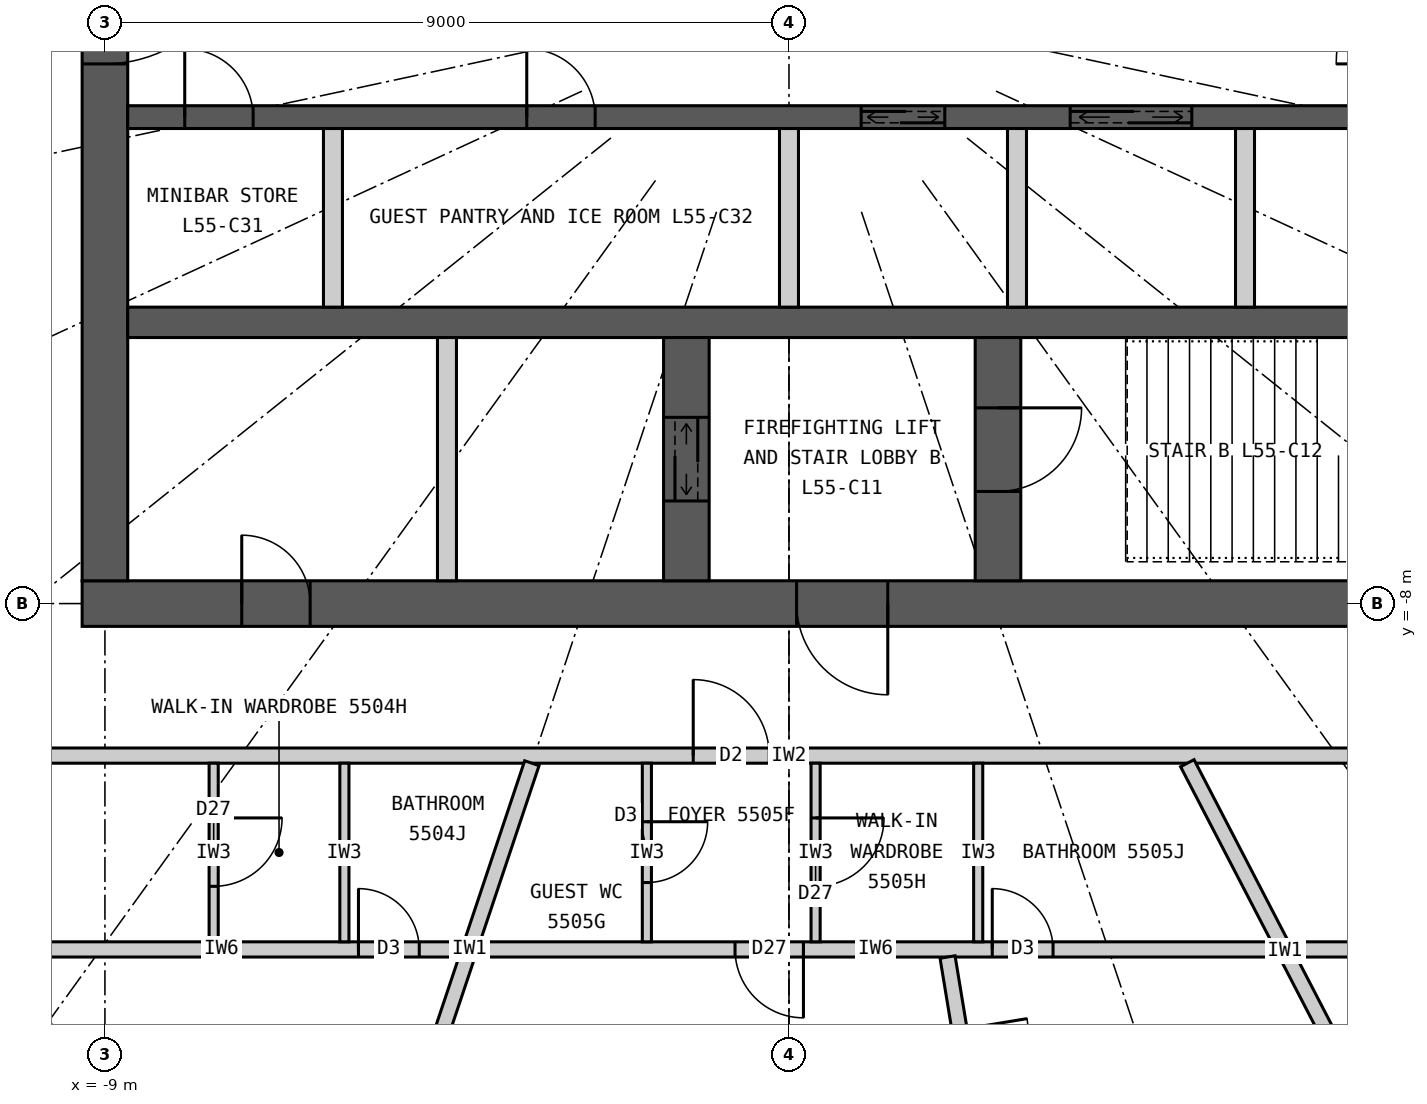
"""IFC4 building model, lengths in metres.
Left out: names, types, materials, properties, quantities, classifications, styles, units other than length and angle.
Written with IfcOpenShell. Run it as: python <this file> out.ifc"""

import sys

from ifc_helpers import new_model, si_unit, direction, frame, frame_2d, origin, origin_2d, place, context, subcontext, project, spatial, rectangle, circle, extrude, element, fill, save


model = new_model("IFC4")
c1 = context("Model", 3, precision=1e-05, world=origin(), true_north=direction((0.0, 1.0)))
c2 = subcontext(c1, "Body", "Model", "MODEL_VIEW")
j1 = project(units=[si_unit("LENGTHUNIT", "METRE"), si_unit("PLANEANGLEUNIT", "RADIAN")], contexts=[c1])
p1 = place(None, origin())
s1 = spatial("IfcSite", under=j1, at=p1, CompositionType="ELEMENT")
p2 = place(p1, origin())
s2 = spatial("IfcBuilding", under=s1, at=p2, CompositionType="ELEMENT")
p3 = place(p2, frame((0.0, 0.0, 206.1)))
s3 = spatial("IfcBuildingStorey", under=s2, at=p3, CompositionType="ELEMENT", Elevation=206.1)
p4 = place(p3, frame((-10.019, -13.883, 0.0), z_axis=(0.0, 0.0, 1.0), x_axis=(1.0, 0.0, 0.0)))
e1 = element("IfcColumn", 1, at=p4, inside=s3, PredefinedType="COLUMN", context=c2, shape_type="SweptSolid", body=[
    extrude(circle(Radius=0.45, at=origin_2d()), origin(), (0.0, 0.0, 1.0), 3.3),
])
p5 = place(p3, frame((9.3, -8.0, 0.0), z_axis=(0.0, 0.0, 1.0), x_axis=(-1.0, 0.0, 0.0)))
e2 = element("IfcWall", 2, at=p5, inside=s3, PredefinedType="SHEAR", context=c2, shape_type="SweptSolid", body=[
    extrude(rectangle(XDim=18.6, YDim=0.6, at=frame_2d((9.3, 0.0))), origin(), (0.0, 0.0, 1.0), 3.3),
])
p6 = place(p5, frame((8.0, 0.0, 0.0)))
e3 = element("IfcOpeningElement", 3, at=p6, cuts=e2, PredefinedType="OPENING", context=c2, shape_type="SweptSolid", body=[
    extrude(rectangle(XDim=1.2, YDim=2.2, at=frame_2d((0.6, 1.1))), frame((0.0, 0.31, 0.0), z_axis=(0.0, -1.0, 0.0), x_axis=(1.0, 0.0, 0.0)), (0.0, 0.0, 1.0), 0.62),
])
p7 = place(p5, frame((15.6, 0.0, 0.0)))
e4 = element("IfcOpeningElement", 4, at=p7, cuts=e2, PredefinedType="OPENING", context=c2, shape_type="SweptSolid", body=[
    extrude(rectangle(XDim=0.9, YDim=2.2, at=frame_2d((0.45, 1.1))), frame((0.0, 0.31, 0.0), z_axis=(0.0, -1.0, 0.0), x_axis=(1.0, 0.0, 0.0)), (0.0, 0.0, 1.0), 0.62),
])
p8 = place(p3, frame((-9.0, 7.7, 0.0), z_axis=(0.0, 0.0, 1.0), x_axis=(0.0, -1.0, 0.0)))
e5 = element("IfcWall", 5, at=p8, inside=s3, PredefinedType="SHEAR", context=c2, shape_type="SweptSolid", body=[
    extrude(rectangle(XDim=15.4, YDim=0.6, at=frame_2d((7.7, 0.0))), origin(), (0.0, 0.0, 1.0), 3.3),
])
p9 = place(p8, frame((6.8, 0.0, 0.0)))
e6 = element("IfcOpeningElement", 6, at=p9, cuts=e5, PredefinedType="OPENING", context=c2, shape_type="SweptSolid", body=[
    extrude(rectangle(XDim=1.8, YDim=2.2, at=frame_2d((0.9, 1.1))), frame((0.0, 0.31, 0.0), z_axis=(0.0, -1.0, 0.0), x_axis=(1.0, 0.0, 0.0)), (0.0, 0.0, 1.0), 0.62),
])
p10 = place(p3, frame((-8.7, -4.3, 0.0), z_axis=(0.0, 0.0, 1.0), x_axis=(1.0, 0.0, 0.0)))
e7 = element("IfcWall", 7, at=p10, inside=s3, PredefinedType="SHEAR", context=c2, shape_type="SweptSolid", body=[
    extrude(rectangle(XDim=17.4, YDim=0.4, at=frame_2d((8.7, 0.0))), origin(), (0.0, 0.0, 1.0), 3.3),
])
p11 = place(p3, frame((-8.7, -1.6, 0.0), z_axis=(0.0, 0.0, 1.0), x_axis=(1.0, 0.0, 0.0)))
e8 = element("IfcWall", 8, at=p11, inside=s3, PredefinedType="SHEAR", context=c2, shape_type="SweptSolid", body=[
    extrude(rectangle(XDim=17.4, YDim=0.3, at=frame_2d((8.7, 0.0))), origin(), (0.0, 0.0, 1.0), 3.3),
])
p12 = place(p11, frame((9.65, 0.0, 0.0)))
e9 = element("IfcOpeningElement", 9, at=p12, cuts=e8, PredefinedType="OPENING", context=c2, shape_type="SweptSolid", body=[
    extrude(rectangle(XDim=1.1, YDim=2.2, at=frame_2d((0.55, 1.1))), frame((0.0, 0.16, 0.0), z_axis=(0.0, -1.0, 0.0), x_axis=(1.0, 0.0, 0.0)), (0.0, 0.0, 1.0), 0.32),
])
p13 = place(p11, frame((12.4, 0.0, 0.0)))
e10 = element("IfcOpeningElement", 10, at=p13, cuts=e8, PredefinedType="OPENING", context=c2, shape_type="SweptSolid", body=[
    extrude(rectangle(XDim=1.6, YDim=2.4, at=frame_2d((0.8, 1.2))), frame((0.0, 0.16, 0.0), z_axis=(0.0, -1.0, 0.0), x_axis=(1.0, 0.0, 0.0)), (0.0, 0.0, 1.0), 0.32),
])
p14 = place(p11, frame((0.75, 0.0, 0.0)))
e11 = element("IfcOpeningElement", 11, at=p14, cuts=e8, PredefinedType="OPENING", context=c2, shape_type="SweptSolid", body=[
    extrude(rectangle(XDim=0.9, YDim=2.2, at=frame_2d((0.45, 1.1))), frame((0.0, 0.16, 0.0), z_axis=(0.0, -1.0, 0.0), x_axis=(1.0, 0.0, 0.0)), (0.0, 0.0, 1.0), 0.32),
])
p15 = place(p11, frame((5.25, 0.0, 0.0)))
e12 = element("IfcOpeningElement", 12, at=p15, cuts=e8, PredefinedType="OPENING", context=c2, shape_type="SweptSolid", body=[
    extrude(rectangle(XDim=0.9, YDim=2.2, at=frame_2d((0.45, 1.1))), frame((0.0, 0.16, 0.0), z_axis=(0.0, -1.0, 0.0), x_axis=(1.0, 0.0, 0.0)), (0.0, 0.0, 1.0), 0.32),
])
p16 = place(p3, frame((2.75, -7.7, 0.0), z_axis=(0.0, 0.0, 1.0), x_axis=(0.0, 1.0, 0.0)))
e13 = element("IfcWall", 13, at=p16, inside=s3, PredefinedType="SHEAR", context=c2, shape_type="SweptSolid", body=[
    extrude(rectangle(XDim=3.2, YDim=0.6, at=frame_2d((1.6, 0.0))), origin(), (0.0, 0.0, 1.0), 3.3),
])
p17 = place(p16, frame((1.175, 0.0, 0.0)))
e14 = element("IfcOpeningElement", 14, at=p17, cuts=e13, PredefinedType="OPENING", context=c2, shape_type="SweptSolid", body=[
    extrude(rectangle(XDim=1.1, YDim=2.2, at=frame_2d((0.55, 1.1))), frame((0.0, 0.31, 0.0), z_axis=(0.0, -1.0, 0.0), x_axis=(1.0, 0.0, 0.0)), (0.0, 0.0, 1.0), 0.62),
])
p18 = place(p3, frame((-1.35, -7.7, 0.0), z_axis=(0.0, 0.0, 1.0), x_axis=(0.0, 1.0, 0.0)))
e15 = element("IfcWall", 15, at=p18, inside=s3, PredefinedType="SHEAR", context=c2, shape_type="SweptSolid", body=[
    extrude(rectangle(XDim=3.2, YDim=0.6, at=frame_2d((1.6, 0.0))), origin(), (0.0, 0.0, 1.0), 3.3),
])
p19 = place(p18, frame((1.05, 0.0, 0.0)))
e16 = element("IfcOpeningElement", 16, at=p19, cuts=e15, PredefinedType="OPENING", context=c2, shape_type="SweptSolid", body=[
    extrude(rectangle(XDim=1.1, YDim=2.2, at=frame_2d((0.55, 1.1))), frame((0.0, 0.31, 0.0), z_axis=(0.0, -1.0, 0.0), x_axis=(1.0, 0.0, 0.0)), (0.0, 0.0, 1.0), 0.62),
])
p20 = place(p3, frame((-4.5, -7.7, 0.0), z_axis=(0.0, 0.0, 1.0), x_axis=(0.0, 1.0, 0.0)))
e17 = element("IfcWall", 17, at=p20, inside=s3, PredefinedType="PARTITIONING", context=c2, shape_type="SweptSolid", body=[
    extrude(rectangle(XDim=3.2, YDim=0.25, at=frame_2d((1.6, 0.0))), origin(), (0.0, 0.0, 1.0), 3.3),
])
for number, where, z_axis, x_axis in (
    (18, (-6.0, -4.1, 0.0), (0.0, 0.0, 1.0), (0.0, 1.0, 0.0)),
    (19, (0.0, -4.1, 0.0), (0.0, 0.0, 1.0), (0.0, 1.0, 0.0)),
    (20, (3.0, -4.1, 0.0), (0.0, 0.0, 1.0), (0.0, 1.0, 0.0)),
    (21, (6.0, -4.1, 0.0), (0.0, 0.0, 1.0), (0.0, 1.0, 0.0)),
):
    element("IfcWall", number, at=place(p3, frame(where, z_axis=z_axis, x_axis=x_axis)), inside=s3, PredefinedType="PARTITIONING", context=c2, shape_type="SweptSolid", body=[
        extrude(rectangle(XDim=2.35, YDim=0.25, at=frame_2d((1.175, 0.0))), origin(), (0.0, 0.0, 1.0), 3.3),
    ])
p21 = place(p3, frame((11.1, -10.0, 0.0), z_axis=(0.0, 0.0, 1.0), x_axis=(-1.0, 0.0, 0.0)))
e22 = element("IfcWall", 22, at=p21, inside=s3, PredefinedType="PARTITIONING", context=c2, shape_type="SweptSolid", body=[
    extrude(rectangle(XDim=22.2, YDim=0.2, at=frame_2d((11.1, 0.0))), origin(), (0.0, 0.0, 1.0), 3.12),
])
p22 = place(p21, frame((11.36, 0.0, 0.0)))
e23 = element("IfcOpeningElement", 23, at=p22, cuts=e22, PredefinedType="OPENING", context=c2, shape_type="SweptSolid", body=[
    extrude(rectangle(XDim=1.0, YDim=2.2, at=frame_2d((0.5, 1.1))), frame((0.0, 0.11, 0.0), z_axis=(0.0, -1.0, 0.0), x_axis=(1.0, 0.0, 0.0)), (0.0, 0.0, 1.0), 0.22),
])
p23 = place(p21, frame((0.595, 0.0, 0.0)))
e24 = element("IfcOpeningElement", 24, at=p23, cuts=e22, PredefinedType="OPENING", context=c2, shape_type="SweptSolid", body=[
    extrude(rectangle(XDim=1.0, YDim=2.2, at=frame_2d((0.5, 1.1))), frame((0.0, 0.11, 0.0), z_axis=(0.0, -1.0, 0.0), x_axis=(1.0, 0.0, 0.0)), (0.0, 0.0, 1.0), 0.22),
])
p24 = place(p3, frame((-3.383, -10.1, 0.0), z_axis=(0.0, 0.0, 1.0), x_axis=(-0.317602151035, -0.948224063003, 0.0)))
e25 = element("IfcWall", 25, at=p24, inside=s3, PredefinedType="PARTITIONING", context=c2, shape_type="SweptSolid", body=[
    extrude(rectangle(XDim=5.168, YDim=0.2, at=frame_2d((2.584, 0.0))), origin(), (0.0, 0.0, 1.0), 2.42),
])
p25 = place(p3, frame((5.241, -10.1, 0.0), z_axis=(0.0, 0.0, 1.0), x_axis=(0.460603196597, -0.887606160008, 0.0)))
e26 = element("IfcWall", 26, at=p25, inside=s3, PredefinedType="PARTITIONING", context=c2, shape_type="SweptSolid", body=[
    extrude(rectangle(XDim=5.58, YDim=0.2, at=frame_2d((2.79, 0.0))), origin(), (0.0, 0.0, 1.0), 3.12),
])
p26 = place(p3, frame((-10.609, -12.55, 0.0), z_axis=(0.0, 0.0, 1.0), x_axis=(1.0, 0.0, 0.0)))
e27 = element("IfcWall", 27, at=p26, inside=s3, PredefinedType="PARTITIONING", context=c2, shape_type="SweptSolid", body=[
    extrude(rectangle(XDim=6.284, YDim=0.2, at=frame_2d((3.142, 0.0))), origin(), (0.0, 0.0, 1.0), 3.12),
])
p27 = place(p26, frame((4.944, 0.0, 0.0)))
e28 = element("IfcOpeningElement", 28, at=p27, cuts=e27, PredefinedType="OPENING", context=c2, shape_type="SweptSolid", body=[
    extrude(rectangle(XDim=0.8, YDim=2.1, at=frame_2d((0.4, 1.05))), frame((0.0, 0.11, 0.0), z_axis=(0.0, -1.0, 0.0), x_axis=(1.0, 0.0, 0.0)), (0.0, 0.0, 1.0), 0.22),
])
p28 = place(p3, frame((-7.569, -10.1, 0.0), z_axis=(0.0, 0.0, 1.0), x_axis=(0.0, -1.0, 0.0)))
e29 = element("IfcWall", 29, at=p28, inside=s3, PredefinedType="PARTITIONING", context=c2, shape_type="SweptSolid", body=[
    extrude(rectangle(XDim=2.35, YDim=0.12, at=frame_2d((1.175, 0.0))), origin(), (0.0, 0.0, 1.0), 3.12),
])
p29 = place(p28, frame((0.72, 0.0, 0.0)))
e30 = element("IfcOpeningElement", 30, at=p29, cuts=e29, PredefinedType="OPENING", context=c2, shape_type="SweptSolid", body=[
    extrude(rectangle(XDim=0.9, YDim=2.1, at=frame_2d((0.45, 1.05))), frame((0.0, 0.07, 0.0), z_axis=(0.0, -1.0, 0.0), x_axis=(1.0, 0.0, 0.0)), (0.0, 0.0, 1.0), 0.14),
])
p30 = place(p3, frame((-5.849, -10.1, 0.0), z_axis=(0.0, 0.0, 1.0), x_axis=(0.0, -1.0, 0.0)))
e31 = element("IfcWall", 31, at=p30, inside=s3, PredefinedType="PARTITIONING", context=c2, shape_type="SweptSolid", body=[
    extrude(rectangle(XDim=2.35, YDim=0.12, at=frame_2d((1.175, 0.0))), origin(), (0.0, 0.0, 1.0), 3.12),
])
p31 = place(p3, frame((-4.082, -12.55, 0.0), z_axis=(0.0, 0.0, 1.0), x_axis=(1.0, 0.0, 0.0)))
e32 = element("IfcWall", 32, at=p31, inside=s3, PredefinedType="PARTITIONING", context=c2, shape_type="SweptSolid", body=[
    extrude(rectangle(XDim=10.446, YDim=0.2, at=frame_2d((5.223, 0.0))), origin(), (0.0, 0.0, 1.0), 3.12),
])
p32 = place(p31, frame((6.757, 0.0, 0.0)))
e33 = element("IfcOpeningElement", 33, at=p32, cuts=e32, PredefinedType="OPENING", context=c2, shape_type="SweptSolid", body=[
    extrude(rectangle(XDim=0.8, YDim=2.1, at=frame_2d((0.4, 1.05))), frame((0.0, 0.11, 0.0), z_axis=(0.0, -1.0, 0.0), x_axis=(1.0, 0.0, 0.0)), (0.0, 0.0, 1.0), 0.22),
])
p33 = place(p31, frame((3.372, 0.0, 0.0)))
e34 = element("IfcOpeningElement", 34, at=p33, cuts=e32, PredefinedType="OPENING", context=c2, shape_type="SweptSolid", body=[
    extrude(rectangle(XDim=0.9, YDim=2.1, at=frame_2d((0.45, 1.05))), frame((0.0, 0.11, 0.0), z_axis=(0.0, -1.0, 0.0), x_axis=(1.0, 0.0, 0.0)), (0.0, 0.0, 1.0), 0.22),
])
p34 = place(p3, frame((2.086, -12.65, 0.0), z_axis=(0.0, 0.0, 1.0), x_axis=(0.162664077359, -0.986681507852, 0.0)))
e35 = element("IfcWall", 35, at=p34, inside=s3, PredefinedType="PARTITIONING", context=c2, shape_type="SweptSolid", body=[
    extrude(rectangle(XDim=3.538, YDim=0.2, at=frame_2d((1.769, 0.0))), origin(), (0.0, 0.0, 1.0), 3.12),
])
p35 = place(p34, frame((0.97, 0.0, 0.0)))
e36 = element("IfcOpeningElement", 36, at=p35, cuts=e35, PredefinedType="OPENING", context=c2, shape_type="SweptSolid", body=[
    extrude(rectangle(XDim=0.9, YDim=2.1, at=frame_2d((0.45, 1.05))), frame((0.0, 0.11, 0.0), z_axis=(0.0, -1.0, 0.0), x_axis=(1.0, 0.0, 0.0)), (0.0, 0.0, 1.0), 0.22),
])
p36 = place(p3, frame((-1.87, -10.1, 0.0), z_axis=(0.0, 0.0, 1.0), x_axis=(0.0, -1.0, 0.0)))
e37 = element("IfcWall", 37, at=p36, inside=s3, PredefinedType="PARTITIONING", context=c2, shape_type="SweptSolid", body=[
    extrude(rectangle(XDim=2.35, YDim=0.12, at=frame_2d((1.175, 0.0))), origin(), (0.0, 0.0, 1.0), 3.12),
])
p37 = place(p36, frame((0.77, 0.0, 0.0)))
e38 = element("IfcOpeningElement", 38, at=p37, cuts=e37, PredefinedType="OPENING", context=c2, shape_type="SweptSolid", body=[
    extrude(rectangle(XDim=0.8, YDim=2.1, at=frame_2d((0.4, 1.05))), frame((0.0, 0.07, 0.0), z_axis=(0.0, -1.0, 0.0), x_axis=(1.0, 0.0, 0.0)), (0.0, 0.0, 1.0), 0.14),
])
p38 = place(p3, frame((0.35, -10.1, 0.0), z_axis=(0.0, 0.0, 1.0), x_axis=(0.0, -1.0, 0.0)))
e39 = element("IfcWall", 39, at=p38, inside=s3, PredefinedType="PARTITIONING", context=c2, shape_type="SweptSolid", body=[
    extrude(rectangle(XDim=2.35, YDim=0.12, at=frame_2d((1.175, 0.0))), origin(), (0.0, 0.0, 1.0), 3.12),
])
p39 = place(p38, frame((0.72, 0.0, 0.0)))
e40 = element("IfcOpeningElement", 40, at=p39, cuts=e39, PredefinedType="OPENING", context=c2, shape_type="SweptSolid", body=[
    extrude(rectangle(XDim=0.9, YDim=2.1, at=frame_2d((0.45, 1.05))), frame((0.0, 0.07, 0.0), z_axis=(0.0, -1.0, 0.0), x_axis=(1.0, 0.0, 0.0)), (0.0, 0.0, 1.0), 0.14),
])
p40 = place(p3, frame((2.49, -10.1, 0.0), z_axis=(0.0, 0.0, 1.0), x_axis=(0.0, -1.0, 0.0)))
e41 = element("IfcWall", 41, at=p40, inside=s3, PredefinedType="PARTITIONING", context=c2, shape_type="SweptSolid", body=[
    extrude(rectangle(XDim=2.35, YDim=0.12, at=frame_2d((1.175, 0.0))), origin(), (0.0, 0.0, 1.0), 3.12),
])
p41 = place(p3, frame((6.661, -12.55, 0.0), z_axis=(0.0, 0.0, 1.0), x_axis=(1.0, 0.0, 0.0)))
e42 = element("IfcWall", 42, at=p41, inside=s3, PredefinedType="PARTITIONING", context=c2, shape_type="SweptSolid", body=[
    extrude(rectangle(XDim=3.947, YDim=0.2, at=frame_2d((1.974, 0.0))), origin(), (0.0, 0.0, 1.0), 3.12),
])
p42 = place(p41, frame((1.52, 0.0, 0.0)))
e43 = element("IfcOpeningElement", 43, at=p42, cuts=e42, PredefinedType="OPENING", context=c2, shape_type="SweptSolid", body=[
    extrude(rectangle(XDim=0.9, YDim=2.1, at=frame_2d((0.45, 1.05))), frame((0.0, 0.11, 0.0), z_axis=(0.0, -1.0, 0.0), x_axis=(1.0, 0.0, 0.0)), (0.0, 0.0, 1.0), 0.22),
])
p43 = place(p29, origin())
e44 = element("IfcDoor", 44, at=p43, inside=s3, OperationType="SINGLE_SWING_LEFT", PredefinedType="DOOR", context=c2, shape_type="SweptSolid", body=[
    extrude(rectangle(XDim=0.9, YDim=2.1, at=frame_2d((0.45, 1.05))), frame((0.0, 0.025, 0.0), z_axis=(0.0, -1.0, 0.0), x_axis=(1.0, 0.0, 0.0)), (0.0, 0.0, 1.0), 0.05),
])
fill(e30, e44)
p44 = place(p27, origin())
e45 = element("IfcDoor", 45, at=p44, inside=s3, OperationType="SINGLE_SWING_LEFT", PredefinedType="DOOR", context=c2, shape_type="SweptSolid", body=[
    extrude(rectangle(XDim=0.8, YDim=2.1, at=frame_2d((0.4, 1.05))), frame((0.0, 0.025, 0.0), z_axis=(0.0, -1.0, 0.0), x_axis=(1.0, 0.0, 0.0)), (0.0, 0.0, 1.0), 0.05),
])
fill(e28, e45)
p45 = place(p22, origin())
e46 = element("IfcDoor", 46, at=p45, inside=s3, OperationType="SINGLE_SWING_RIGHT", PredefinedType="DOOR", context=c2, shape_type="SweptSolid", body=[
    extrude(rectangle(XDim=1.0, YDim=2.2, at=frame_2d((0.5, 1.1))), frame((0.0, 0.025, 0.0), z_axis=(0.0, -1.0, 0.0), x_axis=(1.0, 0.0, 0.0)), (0.0, 0.0, 1.0), 0.05),
])
fill(e23, e46)
p46 = place(p37, origin())
e47 = element("IfcDoor", 47, at=p46, inside=s3, OperationType="SINGLE_SWING_LEFT", PredefinedType="DOOR", context=c2, shape_type="SweptSolid", body=[
    extrude(rectangle(XDim=0.8, YDim=2.1, at=frame_2d((0.4, 1.05))), frame((0.0, 0.025, 0.0), z_axis=(0.0, -1.0, 0.0), x_axis=(1.0, 0.0, 0.0)), (0.0, 0.0, 1.0), 0.05),
])
fill(e38, e47)
p47 = place(p39, origin())
e48 = element("IfcDoor", 48, at=p47, inside=s3, OperationType="SINGLE_SWING_LEFT", PredefinedType="DOOR", context=c2, shape_type="SweptSolid", body=[
    extrude(rectangle(XDim=0.9, YDim=2.1, at=frame_2d((0.45, 1.05))), frame((0.0, 0.025, 0.0), z_axis=(0.0, -1.0, 0.0), x_axis=(1.0, 0.0, 0.0)), (0.0, 0.0, 1.0), 0.05),
])
fill(e40, e48)
p48 = place(p32, origin())
e49 = element("IfcDoor", 49, at=p48, inside=s3, OperationType="SINGLE_SWING_LEFT", PredefinedType="DOOR", context=c2, shape_type="SweptSolid", body=[
    extrude(rectangle(XDim=0.8, YDim=2.1, at=frame_2d((0.4, 1.05))), frame((0.0, 0.025, 0.0), z_axis=(0.0, -1.0, 0.0), x_axis=(1.0, 0.0, 0.0)), (0.0, 0.0, 1.0), 0.05),
])
fill(e33, e49)
p49 = place(p33, origin())
e50 = element("IfcDoor", 50, at=p49, inside=s3, OperationType="SINGLE_SWING_RIGHT", PredefinedType="DOOR", context=c2, shape_type="SweptSolid", body=[
    extrude(rectangle(XDim=0.9, YDim=2.1, at=frame_2d((0.45, 1.05))), frame((0.0, 0.025, 0.0), z_axis=(0.0, -1.0, 0.0), x_axis=(1.0, 0.0, 0.0)), (0.0, 0.0, 1.0), 0.05),
])
fill(e34, e50)
p50 = place(p6, origin())
e51 = element("IfcDoor", 51, at=p50, inside=s3, OperationType="SINGLE_SWING_LEFT", PredefinedType="DOOR", context=c2, shape_type="SweptSolid", body=[
    extrude(rectangle(XDim=1.2, YDim=2.2, at=frame_2d((0.6, 1.1))), frame((0.0, 0.025, 0.0), z_axis=(0.0, -1.0, 0.0), x_axis=(1.0, 0.0, 0.0)), (0.0, 0.0, 1.0), 0.05),
])
fill(e3, e51)
p51 = place(p17, origin())
e52 = element("IfcDoor", 52, at=p51, inside=s3, OperationType="SINGLE_SWING_RIGHT", PredefinedType="DOOR", context=c2, shape_type="SweptSolid", body=[
    extrude(rectangle(XDim=1.1, YDim=2.2, at=frame_2d((0.55, 1.1))), frame((0.0, 0.025, 0.0), z_axis=(0.0, -1.0, 0.0), x_axis=(1.0, 0.0, 0.0)), (0.0, 0.0, 1.0), 0.05),
])
fill(e14, e52)
p52 = place(p19, origin())
e53 = element("IfcDoor", 53, at=p52, inside=s3, OperationType="DOUBLE_DOOR_SLIDING", PredefinedType="DOOR", context=c2, shape_type="SweptSolid", body=[
    extrude(rectangle(XDim=1.1, YDim=2.2, at=frame_2d((0.55, 1.1))), frame((0.0, 0.025, 0.0), z_axis=(0.0, -1.0, 0.0), x_axis=(1.0, 0.0, 0.0)), (0.0, 0.0, 1.0), 0.05),
])
fill(e16, e53)
p53 = place(p7, origin())
e54 = element("IfcDoor", 54, at=p53, inside=s3, OperationType="SINGLE_SWING_RIGHT", PredefinedType="DOOR", context=c2, shape_type="SweptSolid", body=[
    extrude(rectangle(XDim=0.9, YDim=2.2, at=frame_2d((0.45, 1.1))), frame((0.0, 0.025, 0.0), z_axis=(0.0, -1.0, 0.0), x_axis=(1.0, 0.0, 0.0)), (0.0, 0.0, 1.0), 0.05),
])
fill(e4, e54)
p54 = place(p12, origin())
e55 = element("IfcDoor", 55, at=p54, inside=s3, OperationType="DOUBLE_DOOR_SLIDING", PredefinedType="DOOR", context=c2, shape_type="SweptSolid", body=[
    extrude(rectangle(XDim=1.1, YDim=2.2, at=frame_2d((0.55, 1.1))), frame((0.0, 0.025, 0.0), z_axis=(0.0, -1.0, 0.0), x_axis=(1.0, 0.0, 0.0)), (0.0, 0.0, 1.0), 0.05),
])
fill(e9, e55)
p55 = place(p13, origin())
e56 = element("IfcDoor", 56, at=p55, inside=s3, OperationType="DOUBLE_DOOR_SLIDING", PredefinedType="DOOR", context=c2, shape_type="SweptSolid", body=[
    extrude(rectangle(XDim=1.6, YDim=2.4, at=frame_2d((0.8, 1.2))), frame((0.0, 0.025, 0.0), z_axis=(0.0, -1.0, 0.0), x_axis=(1.0, 0.0, 0.0)), (0.0, 0.0, 1.0), 0.05),
])
fill(e10, e56)
p56 = place(p14, origin())
e57 = element("IfcDoor", 57, at=p56, inside=s3, OperationType="SINGLE_SWING_LEFT", PredefinedType="DOOR", context=c2, shape_type="SweptSolid", body=[
    extrude(rectangle(XDim=0.9, YDim=2.2, at=frame_2d((0.45, 1.1))), frame((0.0, 0.025, 0.0), z_axis=(0.0, -1.0, 0.0), x_axis=(1.0, 0.0, 0.0)), (0.0, 0.0, 1.0), 0.05),
])
fill(e11, e57)
p57 = place(p15, origin())
e58 = element("IfcDoor", 58, at=p57, inside=s3, OperationType="SINGLE_SWING_LEFT", PredefinedType="DOOR", context=c2, shape_type="SweptSolid", body=[
    extrude(rectangle(XDim=0.9, YDim=2.2, at=frame_2d((0.45, 1.1))), frame((0.0, 0.025, 0.0), z_axis=(0.0, -1.0, 0.0), x_axis=(1.0, 0.0, 0.0)), (0.0, 0.0, 1.0), 0.05),
])
fill(e12, e58)
p58 = place(p9, origin())
e59 = element("IfcDoor", 59, at=p58, inside=s3, OperationType="DOUBLE_DOOR_DOUBLE_SWING", PredefinedType="DOOR", context=c2, shape_type="SweptSolid", body=[
    extrude(rectangle(XDim=1.8, YDim=2.2, at=frame_2d((0.9, 1.1))), frame((0.0, 0.025, 0.0), z_axis=(0.0, -1.0, 0.0), x_axis=(1.0, 0.0, 0.0)), (0.0, 0.0, 1.0), 0.05),
])
fill(e6, e59)
save(model, sys.argv[1])
